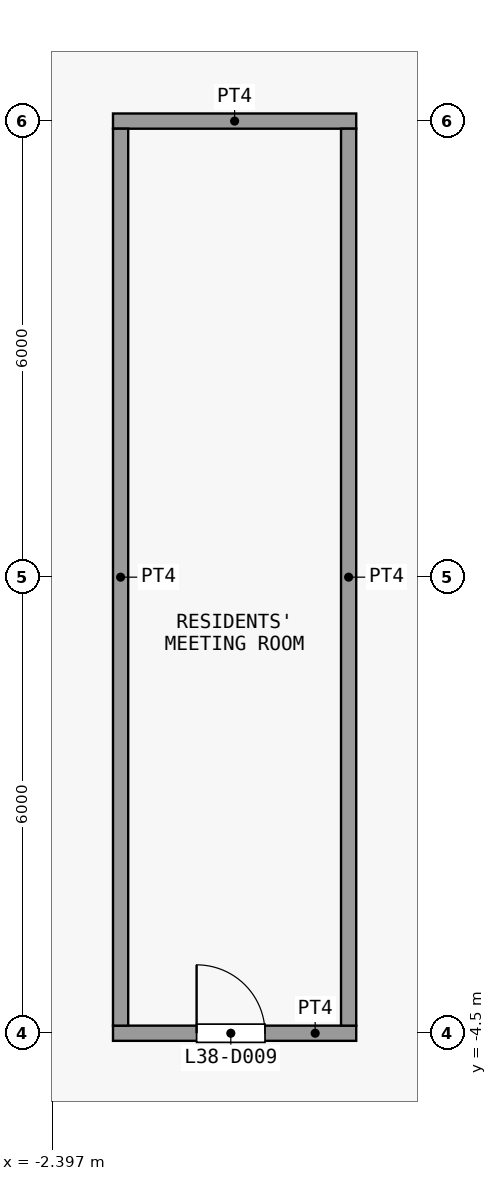
"""IFC4 building model, lengths in metres.
Left out: names, types, materials, properties, quantities, classifications, styles, units other than length and angle.
Written with IfcOpenShell. Run it as: python <this file> out.ifc"""

import sys

from ifc_helpers import new_model, si_unit, direction, frame, frame_2d, origin, place, context, subcontext, project, spatial, rectangle, extrude, element, fill, save


model = new_model("IFC4")
c1 = context("Model", 3, precision=1e-05, world=origin(), true_north=direction((0.0, 1.0)))
c2 = subcontext(c1, "Body", "Model", "MODEL_VIEW")
j1 = project(units=[si_unit("LENGTHUNIT", "METRE"), si_unit("PLANEANGLEUNIT", "RADIAN")], contexts=[c1])
p1 = place(None, origin())
s1 = spatial("IfcSite", under=j1, at=p1, CompositionType="ELEMENT")
p2 = place(p1, origin())
s2 = spatial("IfcBuilding", under=s1, at=p2, CompositionType="ELEMENT")
p3 = place(p2, frame((0.0, 0.0, 156.5)))
s3 = spatial("IfcBuildingStorey", under=s2, at=p3, CompositionType="ELEMENT", Elevation=156.5)
p4 = place(p3, frame((-1.6, -4.5, 0.0), z_axis=(0.0, 0.0, 1.0), x_axis=(1.0, 0.0, 0.0)))
e1 = element("IfcWall", 1, at=p4, inside=s3, PredefinedType="PARTITIONING", context=c2, shape_type="SweptSolid", body=[
    extrude(rectangle(XDim=3.2, YDim=0.2, at=frame_2d((1.6, 0.0))), origin(), (0.0, 0.0, 1.0), 3.3),
])
p5 = place(p4, frame((1.1, 0.0, 0.0)))
e2 = element("IfcOpeningElement", 2, at=p5, cuts=e1, PredefinedType="OPENING", context=c2, shape_type="SweptSolid", body=[
    extrude(rectangle(XDim=0.9, YDim=2.1, at=frame_2d((0.45, 1.05))), frame((0.0, 0.11, 0.0), z_axis=(0.0, -1.0, 0.0), x_axis=(1.0, 0.0, 0.0)), (0.0, 0.0, 1.0), 0.22),
])
p6 = place(p3, frame((-1.6, 7.5, 0.0), z_axis=(0.0, 0.0, 1.0), x_axis=(1.0, 0.0, 0.0)))
e3 = element("IfcWall", 3, at=p6, inside=s3, PredefinedType="PARTITIONING", context=c2, shape_type="SweptSolid", body=[
    extrude(rectangle(XDim=3.2, YDim=0.2, at=frame_2d((1.6, 0.0))), origin(), (0.0, 0.0, 1.0), 3.3),
])
for number, where, z_axis, x_axis in (
    (4, (-1.5, -4.4, 0.0), (0.0, 0.0, 1.0), (0.0, 1.0, 0.0)),
    (5, (1.5, -4.4, 0.0), (0.0, 0.0, 1.0), (0.0, 1.0, 0.0)),
):
    element("IfcWall", number, at=place(p3, frame(where, z_axis=z_axis, x_axis=x_axis)), inside=s3, PredefinedType="PARTITIONING", context=c2, shape_type="SweptSolid", body=[
        extrude(rectangle(XDim=11.8, YDim=0.2, at=frame_2d((5.9, 0.0))), origin(), (0.0, 0.0, 1.0), 3.3),
    ])
p7 = place(p5, origin())
e6 = element("IfcDoor", 6, at=p7, inside=s3, OperationType="SINGLE_SWING_RIGHT", PredefinedType="DOOR", context=c2, shape_type="SweptSolid", body=[
    extrude(rectangle(XDim=0.9, YDim=2.1, at=frame_2d((0.45, 1.05))), frame((0.0, 0.025, 0.0), z_axis=(0.0, -1.0, 0.0), x_axis=(1.0, 0.0, 0.0)), (0.0, 0.0, 1.0), 0.05),
])
fill(e2, e6)
save(model, sys.argv[1])
